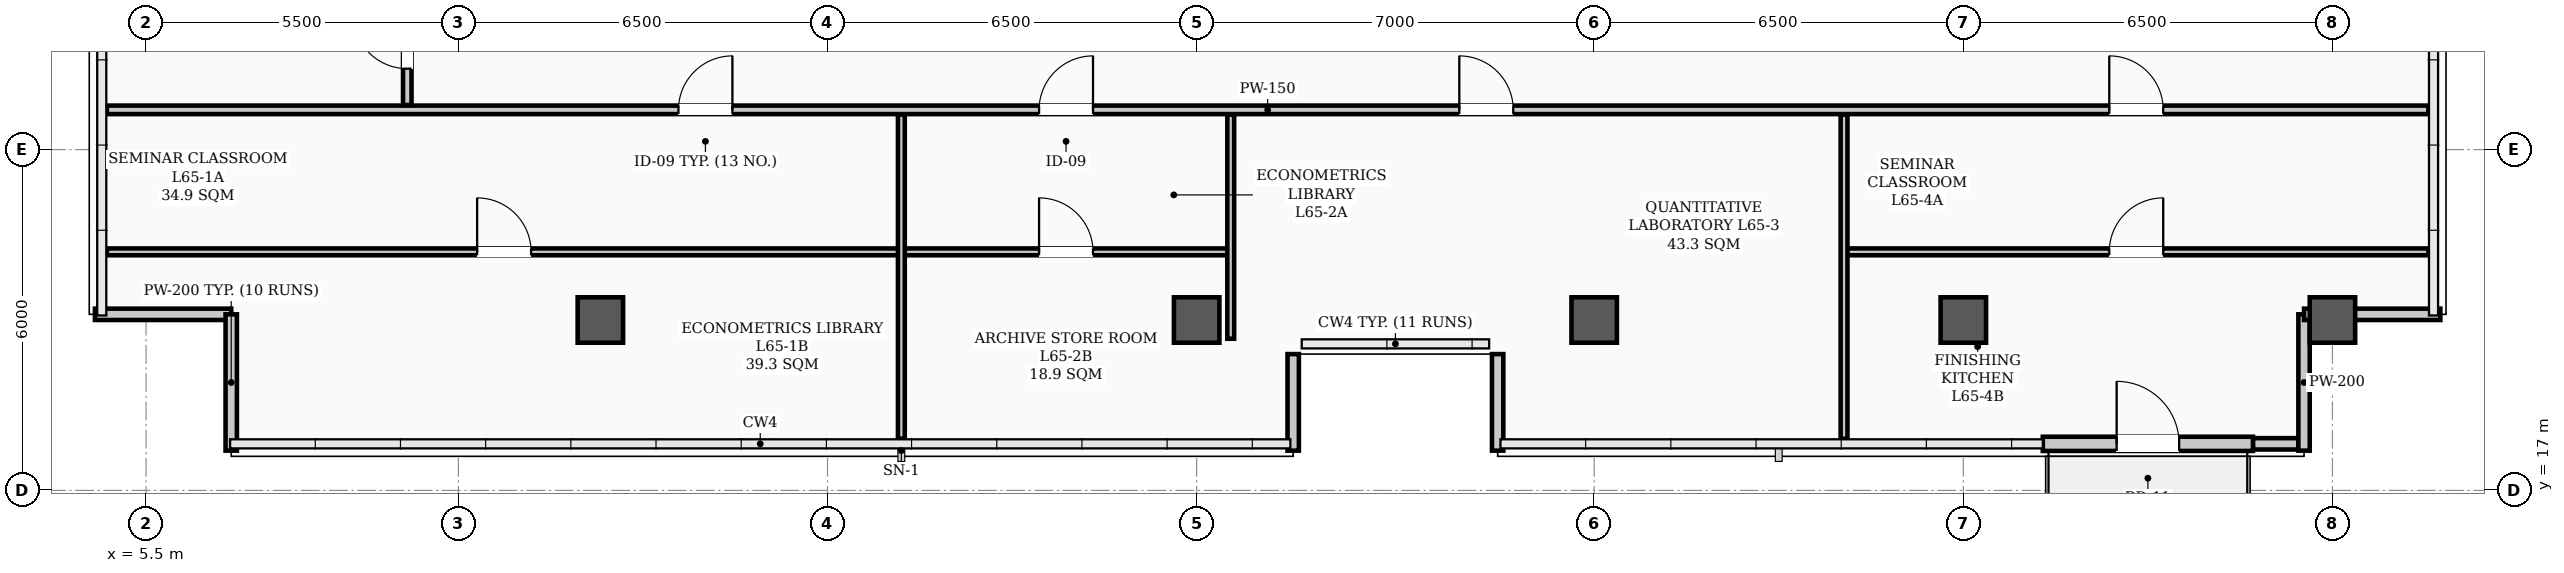
"""IFC4 building model, lengths in metres.
Left out: names, types, materials, properties, quantities, classifications, styles, units other than length and angle.
Written with IfcOpenShell. Run it as: python <this file> out.ifc"""

import sys

from ifc_helpers import new_model, si_unit, direction, frame, frame_2d, origin, origin_2d, place, context, subcontext, project, spatial, rectangle, hollow_rectangle, extrude, element, fill, save


model = new_model("IFC4")
c1 = context("Model", 3, precision=1e-05, world=origin(), true_north=direction((0.0, 1.0)))
c2 = subcontext(c1, "Body", "Model", "MODEL_VIEW")
j1 = project(units=[si_unit("LENGTHUNIT", "METRE"), si_unit("PLANEANGLEUNIT", "RADIAN")], contexts=[c1])
p1 = place(None, origin())
s1 = spatial("IfcSite", under=j1, at=p1, CompositionType="ELEMENT")
p2 = place(p1, origin())
s2 = spatial("IfcBuilding", under=s1, at=p2, CompositionType="ELEMENT")
p3 = place(p2, frame((0.0, 0.0, 261.8)))
s3 = spatial("IfcBuildingStorey", under=s2, at=p3, CompositionType="ELEMENT", Elevation=261.8)
for number, where, z_axis, x_axis in (
    (1, (13.5, 20.0, 0.0), (0.0, 0.0, 1.0), (1.0, 0.0, 0.0)),
    (2, (24.0, 20.0, 0.0), (0.0, 0.0, 1.0), (1.0, 0.0, 0.0)),
    (3, (31.0, 20.0, 0.0), (0.0, 0.0, 1.0), (1.0, 0.0, 0.0)),
    (4, (37.5, 20.0, 0.0), (0.0, 0.0, 1.0), (1.0, 0.0, 0.0)),
    (5, (44.0, 20.0, 0.0), (0.0, 0.0, 1.0), (1.0, 0.0, 0.0)),
):
    element("IfcColumn", number, at=place(p3, frame(where, z_axis=z_axis, x_axis=x_axis)), inside=s3, PredefinedType="COLUMN", context=c2, shape_type="SweptSolid", body=[
        extrude(hollow_rectangle(XDim=0.8, YDim=0.8, WallThickness=0.032, InnerFilletRadius=0.016, OuterFilletRadius=0.048, at=origin_2d()), origin(), (0.0, 0.0, 1.0), 3.9),
    ])
p4 = place(p3, frame((42.6, 17.82, 0.0), z_axis=(0.0, 0.0, 1.0), x_axis=(1.0, 0.0, 0.0)))
e6 = element("IfcWall", 6, at=p4, inside=s3, PredefinedType="PARAPET", context=c2, shape_type="SweptSolid", body=[
    extrude(rectangle(XDim=0.8, YDim=0.2, at=frame_2d((0.4, 0.0))), origin(), (0.0, 0.0, 1.0), 1.2),
])
p5 = place(p3, frame((4.6, 20.1, 0.0), z_axis=(0.0, 0.0, 1.0), x_axis=(1.0, 0.0, 0.0)))
e7 = element("IfcWall", 7, at=p5, inside=s3, PredefinedType="PARAPET", context=c2, shape_type="SweptSolid", body=[
    extrude(rectangle(XDim=2.4, YDim=0.2, at=frame_2d((1.2, 0.0))), origin(), (0.0, 0.0, 1.0), 1.2),
])
for number, where, z_axis, x_axis in (
    (8, (7.0, 20.1, 0.0), (0.0, 0.0, 1.0), (0.0, -1.0, 0.0)),
    (9, (43.5, 17.7, 0.0), (0.0, 0.0, 1.0), (0.0, 1.0, 0.0)),
):
    element("IfcWall", number, at=place(p3, frame(where, z_axis=z_axis, x_axis=x_axis)), inside=s3, PredefinedType="PARAPET", context=c2, shape_type="SweptSolid", body=[
        extrude(rectangle(XDim=2.4, YDim=0.2, at=frame_2d((1.2, 0.0))), origin(), (0.0, 0.0, 1.0), 1.2),
    ])
p6 = place(p3, frame((43.5, 20.1, 0.0), z_axis=(0.0, 0.0, 1.0), x_axis=(1.0, 0.0, 0.0)))
e10 = element("IfcWall", 10, at=p6, inside=s3, PredefinedType="PARAPET", context=c2, shape_type="SweptSolid", body=[
    extrude(rectangle(XDim=2.4, YDim=0.2, at=frame_2d((1.2, 0.0))), origin(), (0.0, 0.0, 1.0), 1.2),
])
for number, where, z_axis, x_axis in (
    (11, (25.7, 17.7, 0.0), (0.0, 0.0, 1.0), (0.0, 1.0, 0.0)),
    (12, (29.3, 19.4, 0.0), (0.0, 0.0, 1.0), (0.0, -1.0, 0.0)),
):
    element("IfcWall", number, at=place(p3, frame(where, z_axis=z_axis, x_axis=x_axis)), inside=s3, PredefinedType="PARAPET", context=c2, shape_type="SweptSolid", body=[
        extrude(rectangle(XDim=1.7, YDim=0.2, at=frame_2d((0.85, 0.0))), origin(), (0.0, 0.0, 1.0), 1.2),
    ])
p7 = place(p3, frame((38.9, 17.82, 0.0), z_axis=(0.0, 0.0, 1.0), x_axis=(1.0, 0.0, 0.0)))
e13 = element("IfcWall", 13, at=p7, inside=s3, PredefinedType="STANDARD", context=c2, shape_type="SweptSolid", body=[
    extrude(rectangle(XDim=3.7, YDim=0.25, at=frame_2d((1.85, 0.0))), origin(), (0.0, 0.0, 1.0), 3.18),
])
p8 = place(p7, frame((1.3, 0.0, 0.0)))
e14 = element("IfcOpeningElement", 14, at=p8, cuts=e13, PredefinedType="OPENING", context=c2, shape_type="SweptSolid", body=[
    extrude(rectangle(XDim=1.1, YDim=2.2, at=frame_2d((0.55, 1.1))), frame((0.0, 0.135, 0.0), z_axis=(0.0, -1.0, 0.0), x_axis=(1.0, 0.0, 0.0)), (0.0, 0.0, 1.0), 0.27),
])
p9 = place(p3, frame((4.81, 23.7, 0.0), z_axis=(0.0, 0.0, 1.0), x_axis=(1.0, 0.0, 0.0)))
e15 = element("IfcWall", 15, at=p9, inside=s3, PredefinedType="PARTITIONING", context=c2, shape_type="SweptSolid", body=[
    extrude(rectangle(XDim=40.88, YDim=0.15, at=frame_2d((20.44, 0.0))), origin(), (0.0, 0.0, 1.0), 3.2),
])
p10 = place(p9, frame((10.065, 0.0, 0.0)))
e16 = element("IfcOpeningElement", 16, at=p10, cuts=e15, PredefinedType="OPENING", context=c2, shape_type="SweptSolid", body=[
    extrude(rectangle(XDim=0.95, YDim=2.08, at=frame_2d((0.475, 1.04))), frame((0.0, 0.085, 0.0), z_axis=(0.0, -1.0, 0.0), x_axis=(1.0, 0.0, 0.0)), (0.0, 0.0, 1.0), 0.17),
])
p11 = place(p9, frame((16.415, 0.0, 0.0)))
e17 = element("IfcOpeningElement", 17, at=p11, cuts=e15, PredefinedType="OPENING", context=c2, shape_type="SweptSolid", body=[
    extrude(rectangle(XDim=0.95, YDim=2.08, at=frame_2d((0.475, 1.04))), frame((0.0, 0.085, 0.0), z_axis=(0.0, -1.0, 0.0), x_axis=(1.0, 0.0, 0.0)), (0.0, 0.0, 1.0), 0.17),
])
p12 = place(p9, frame((23.815, 0.0, 0.0)))
e18 = element("IfcOpeningElement", 18, at=p12, cuts=e15, PredefinedType="OPENING", context=c2, shape_type="SweptSolid", body=[
    extrude(rectangle(XDim=0.95, YDim=2.08, at=frame_2d((0.475, 1.04))), frame((0.0, 0.085, 0.0), z_axis=(0.0, -1.0, 0.0), x_axis=(1.0, 0.0, 0.0)), (0.0, 0.0, 1.0), 0.17),
])
p13 = place(p9, frame((35.26, 0.0, 0.0)))
e19 = element("IfcOpeningElement", 19, at=p13, cuts=e15, PredefinedType="OPENING", context=c2, shape_type="SweptSolid", body=[
    extrude(rectangle(XDim=0.95, YDim=2.08, at=frame_2d((0.475, 1.04))), frame((0.0, 0.085, 0.0), z_axis=(0.0, -1.0, 0.0), x_axis=(1.0, 0.0, 0.0)), (0.0, 0.0, 1.0), 0.17),
])
p14 = place(p3, frame((4.81, 21.2, 0.0), z_axis=(0.0, 0.0, 1.0), x_axis=(1.0, 0.0, 0.0)))
e20 = element("IfcWall", 20, at=p14, inside=s3, PredefinedType="PARTITIONING", context=c2, shape_type="SweptSolid", body=[
    extrude(rectangle(XDim=13.99, YDim=0.12, at=frame_2d((6.995, 0.0))), origin(), (0.0, 0.0, 1.0), 3.2),
])
p15 = place(p14, frame((6.52, 0.0, 0.0)))
e21 = element("IfcOpeningElement", 21, at=p15, cuts=e20, PredefinedType="OPENING", context=c2, shape_type="SweptSolid", body=[
    extrude(rectangle(XDim=0.95, YDim=2.08, at=frame_2d((0.475, 1.04))), frame((0.0, 0.07, 0.0), z_axis=(0.0, -1.0, 0.0), x_axis=(1.0, 0.0, 0.0)), (0.0, 0.0, 1.0), 0.14),
])
p16 = place(p3, frame((18.8, 21.2, 0.0), z_axis=(0.0, 0.0, 1.0), x_axis=(1.0, 0.0, 0.0)))
e22 = element("IfcWall", 22, at=p16, inside=s3, PredefinedType="PARTITIONING", context=c2, shape_type="SweptSolid", body=[
    extrude(rectangle(XDim=5.8, YDim=0.12, at=frame_2d((2.9, 0.0))), origin(), (0.0, 0.0, 1.0), 3.2),
])
p17 = place(p16, frame((2.425, 0.0, 0.0)))
e23 = element("IfcOpeningElement", 23, at=p17, cuts=e22, PredefinedType="OPENING", context=c2, shape_type="SweptSolid", body=[
    extrude(rectangle(XDim=0.95, YDim=2.08, at=frame_2d((0.475, 1.04))), frame((0.0, 0.07, 0.0), z_axis=(0.0, -1.0, 0.0), x_axis=(1.0, 0.0, 0.0)), (0.0, 0.0, 1.0), 0.14),
])
p18 = place(p3, frame((35.4, 21.2, 0.0), z_axis=(0.0, 0.0, 1.0), x_axis=(1.0, 0.0, 0.0)))
e24 = element("IfcWall", 24, at=p18, inside=s3, PredefinedType="PARTITIONING", context=c2, shape_type="SweptSolid", body=[
    extrude(rectangle(XDim=10.29, YDim=0.12, at=frame_2d((5.145, 0.0))), origin(), (0.0, 0.0, 1.0), 3.2),
])
p19 = place(p18, frame((4.67, 0.0, 0.0)))
e25 = element("IfcOpeningElement", 25, at=p19, cuts=e24, PredefinedType="OPENING", context=c2, shape_type="SweptSolid", body=[
    extrude(rectangle(XDim=0.95, YDim=2.08, at=frame_2d((0.475, 1.04))), frame((0.0, 0.07, 0.0), z_axis=(0.0, -1.0, 0.0), x_axis=(1.0, 0.0, 0.0)), (0.0, 0.0, 1.0), 0.14),
])
p20 = place(p3, frame((10.1, 23.785, 0.0), z_axis=(0.0, 0.0, 1.0), x_axis=(0.0, 1.0, 0.0)))
e26 = element("IfcWall", 26, at=p20, inside=s3, PredefinedType="PARTITIONING", context=c2, shape_type="SweptSolid", body=[
    extrude(rectangle(XDim=17.88, YDim=0.15, at=frame_2d((8.94, 0.0))), origin(), (0.0, 0.0, 1.0), 3.1),
])
p21 = place(p20, frame((0.64, 0.0, 0.0)))
e27 = element("IfcOpeningElement", 27, at=p21, cuts=e26, PredefinedType="OPENING", context=c2, shape_type="SweptSolid", body=[
    extrude(rectangle(XDim=0.95, YDim=2.08, at=frame_2d((0.475, 1.04))), frame((0.0, 0.085, 0.0), z_axis=(0.0, -1.0, 0.0), x_axis=(1.0, 0.0, 0.0)), (0.0, 0.0, 1.0), 0.17),
])
p22 = place(p20, frame((13.015, 0.0, 0.0)))
e28 = element("IfcOpeningElement", 28, at=p22, cuts=e26, PredefinedType="OPENING", context=c2, shape_type="SweptSolid", body=[
    extrude(rectangle(XDim=0.95, YDim=2.08, at=frame_2d((0.475, 1.04))), frame((0.0, 0.085, 0.0), z_axis=(0.0, -1.0, 0.0), x_axis=(1.0, 0.0, 0.0)), (0.0, 0.0, 1.0), 0.17),
])
p23 = place(p3, frame((18.8, 17.91, 0.0), z_axis=(0.0, 0.0, 1.0), x_axis=(0.0, 1.0, 0.0)))
e29 = element("IfcWall", 29, at=p23, inside=s3, PredefinedType="PARTITIONING", context=c2, shape_type="SweptSolid", body=[
    extrude(rectangle(XDim=5.705, YDim=0.12, at=frame_2d((2.853, 0.0))), origin(), (0.0, 0.0, 1.0), 3.1),
])
p24 = place(p3, frame((24.6, 19.67, 0.0), z_axis=(0.0, 0.0, 1.0), x_axis=(0.0, 1.0, 0.0)))
e30 = element("IfcWall", 30, at=p24, inside=s3, PredefinedType="PARTITIONING", context=c2, shape_type="SweptSolid", body=[
    extrude(rectangle(XDim=3.945, YDim=0.12, at=frame_2d((1.973, 0.0))), origin(), (0.0, 0.0, 1.0), 3.1),
])
p25 = place(p3, frame((35.4, 17.91, 0.0), z_axis=(0.0, 0.0, 1.0), x_axis=(0.0, 1.0, 0.0)))
e31 = element("IfcWall", 31, at=p25, inside=s3, PredefinedType="PARTITIONING", context=c2, shape_type="SweptSolid", body=[
    extrude(rectangle(XDim=5.705, YDim=0.12, at=frame_2d((2.853, 0.0))), origin(), (0.0, 0.0, 1.0), 3.1),
])
p26 = place(p8, origin())
e32 = element("IfcDoor", 32, at=p26, inside=s3, OperationType="SINGLE_SWING_LEFT", PredefinedType="DOOR", context=c2, shape_type="SweptSolid", body=[
    extrude(rectangle(XDim=1.1, YDim=2.2, at=frame_2d((0.55, 1.1))), frame((0.0, 0.025, 0.0), z_axis=(0.0, -1.0, 0.0), x_axis=(1.0, 0.0, 0.0)), (0.0, 0.0, 1.0), 0.05),
])
fill(e14, e32)
p27 = place(p15, origin())
e33 = element("IfcDoor", 33, at=p27, inside=s3, OperationType="SINGLE_SWING_LEFT", PredefinedType="DOOR", context=c2, shape_type="SweptSolid", body=[
    extrude(rectangle(XDim=0.95, YDim=2.08, at=frame_2d((0.475, 1.04))), frame((0.0, 0.025, 0.0), z_axis=(0.0, -1.0, 0.0), x_axis=(1.0, 0.0, 0.0)), (0.0, 0.0, 1.0), 0.05),
])
fill(e21, e33)
p28 = place(p10, origin())
e34 = element("IfcDoor", 34, at=p28, inside=s3, OperationType="SINGLE_SWING_RIGHT", PredefinedType="DOOR", context=c2, shape_type="SweptSolid", body=[
    extrude(rectangle(XDim=0.95, YDim=2.08, at=frame_2d((0.475, 1.04))), frame((0.0, 0.025, 0.0), z_axis=(0.0, -1.0, 0.0), x_axis=(1.0, 0.0, 0.0)), (0.0, 0.0, 1.0), 0.05),
])
fill(e16, e34)
p29 = place(p17, origin())
e35 = element("IfcDoor", 35, at=p29, inside=s3, OperationType="SINGLE_SWING_LEFT", PredefinedType="DOOR", context=c2, shape_type="SweptSolid", body=[
    extrude(rectangle(XDim=0.95, YDim=2.08, at=frame_2d((0.475, 1.04))), frame((0.0, 0.025, 0.0), z_axis=(0.0, -1.0, 0.0), x_axis=(1.0, 0.0, 0.0)), (0.0, 0.0, 1.0), 0.05),
])
fill(e23, e35)
p30 = place(p11, origin())
e36 = element("IfcDoor", 36, at=p30, inside=s3, OperationType="SINGLE_SWING_RIGHT", PredefinedType="DOOR", context=c2, shape_type="SweptSolid", body=[
    extrude(rectangle(XDim=0.95, YDim=2.08, at=frame_2d((0.475, 1.04))), frame((0.0, 0.025, 0.0), z_axis=(0.0, -1.0, 0.0), x_axis=(1.0, 0.0, 0.0)), (0.0, 0.0, 1.0), 0.05),
])
fill(e17, e36)
p31 = place(p12, origin())
e37 = element("IfcDoor", 37, at=p31, inside=s3, OperationType="SINGLE_SWING_LEFT", PredefinedType="DOOR", context=c2, shape_type="SweptSolid", body=[
    extrude(rectangle(XDim=0.95, YDim=2.08, at=frame_2d((0.475, 1.04))), frame((0.0, 0.025, 0.0), z_axis=(0.0, -1.0, 0.0), x_axis=(1.0, 0.0, 0.0)), (0.0, 0.0, 1.0), 0.05),
])
fill(e18, e37)
p32 = place(p19, origin())
e38 = element("IfcDoor", 38, at=p32, inside=s3, OperationType="SINGLE_SWING_RIGHT", PredefinedType="DOOR", context=c2, shape_type="SweptSolid", body=[
    extrude(rectangle(XDim=0.95, YDim=2.08, at=frame_2d((0.475, 1.04))), frame((0.0, 0.025, 0.0), z_axis=(0.0, -1.0, 0.0), x_axis=(1.0, 0.0, 0.0)), (0.0, 0.0, 1.0), 0.05),
])
fill(e25, e38)
p33 = place(p13, origin())
e39 = element("IfcDoor", 39, at=p33, inside=s3, OperationType="SINGLE_SWING_LEFT", PredefinedType="DOOR", context=c2, shape_type="SweptSolid", body=[
    extrude(rectangle(XDim=0.95, YDim=2.08, at=frame_2d((0.475, 1.04))), frame((0.0, 0.025, 0.0), z_axis=(0.0, -1.0, 0.0), x_axis=(1.0, 0.0, 0.0)), (0.0, 0.0, 1.0), 0.05),
])
fill(e19, e39)
p34 = place(p21, origin())
e40 = element("IfcDoor", 40, at=p34, inside=s3, OperationType="SINGLE_SWING_RIGHT", PredefinedType="DOOR", context=c2, shape_type="SweptSolid", body=[
    extrude(rectangle(XDim=0.95, YDim=2.08, at=frame_2d((0.475, 1.04))), frame((0.0, 0.025, 0.0), z_axis=(0.0, -1.0, 0.0), x_axis=(1.0, 0.0, 0.0)), (0.0, 0.0, 1.0), 0.05),
])
fill(e27, e40)
save(model, sys.argv[1])
